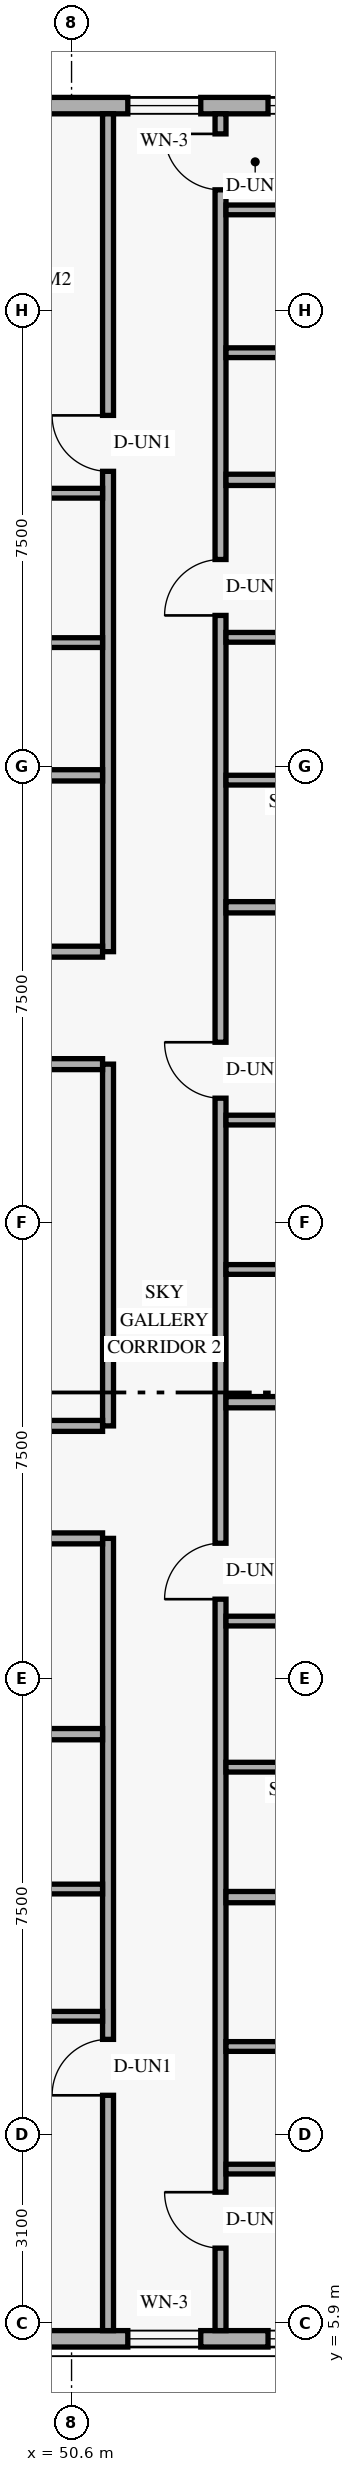
"""IFC4 building model, lengths in metres.
Left out: names, types, materials, properties, quantities, classifications, styles, units other than length and angle.
Written with IfcOpenShell. Run it as: python <this file> out.ifc"""

import sys

from ifc_helpers import new_model, si_unit, direction, frame, frame_2d, origin, place, context, subcontext, project, spatial, rectangle, extrude, element, fill, save


model = new_model("IFC4")
c1 = context("Model", 3, precision=1e-05, world=origin(), true_north=direction((0.0, 1.0)))
c2 = subcontext(c1, "Body", "Model", "MODEL_VIEW")
j1 = project(units=[si_unit("LENGTHUNIT", "METRE"), si_unit("PLANEANGLEUNIT", "RADIAN")], contexts=[c1])
p1 = place(None, origin())
s1 = spatial("IfcSite", under=j1, at=p1, CompositionType="ELEMENT")
p2 = place(p1, origin())
s2 = spatial("IfcBuilding", under=s1, at=p2, CompositionType="ELEMENT")
p3 = place(p2, frame((0.0, 0.0, 235.2)))
s3 = spatial("IfcBuildingStorey", under=s2, at=p3, CompositionType="ELEMENT", Elevation=235.2)
p4 = place(p3, frame((25.82, 5.635, 0.0), z_axis=(0.0, 0.0, 1.0), x_axis=(1.0, 0.0, 0.0)))
e1 = element("IfcWall", 1, at=p4, inside=s3, PredefinedType="SOLIDWALL", context=c2, shape_type="SweptSolid", body=[
    extrude(rectangle(XDim=32.96, YDim=0.27, at=frame_2d((16.48, 0.0))), origin(), (0.0, 0.0, 1.0), 3.36),
])
p5 = place(p4, frame((3.795, 0.0, 0.85)))
e2 = element("IfcOpeningElement", 2, at=p5, cuts=e1, PredefinedType="OPENING", context=c2, shape_type="SweptSolid", body=[
    extrude(rectangle(XDim=1.35, YDim=1.55, at=frame_2d((0.675, 0.775))), frame((0.0, 0.145, 0.0), z_axis=(0.0, -1.0, 0.0), x_axis=(1.0, 0.0, 0.0)), (0.0, 0.0, 1.0), 0.29),
])
p6 = place(p4, frame((16.176, 0.0, 0.85)))
e3 = element("IfcOpeningElement", 3, at=p6, cuts=e1, PredefinedType="OPENING", context=c2, shape_type="SweptSolid", body=[
    extrude(rectangle(XDim=1.35, YDim=1.55, at=frame_2d((0.675, 0.775))), frame((0.0, 0.145, 0.0), z_axis=(0.0, -1.0, 0.0), x_axis=(1.0, 0.0, 0.0)), (0.0, 0.0, 1.0), 0.29),
])
p7 = place(p4, frame((25.705, 0.0, 0.85)))
e4 = element("IfcOpeningElement", 4, at=p7, cuts=e1, PredefinedType="OPENING", context=c2, shape_type="SweptSolid", body=[
    extrude(rectangle(XDim=1.2, YDim=1.5, at=frame_2d((0.6, 0.75))), frame((0.0, 0.145, 0.0), z_axis=(0.0, -1.0, 0.0), x_axis=(1.0, 0.0, 0.0)), (0.0, 0.0, 1.0), 0.29),
])
p8 = place(p4, frame((28.011, 0.0, 0.85)))
e5 = element("IfcOpeningElement", 5, at=p8, cuts=e1, PredefinedType="OPENING", context=c2, shape_type="SweptSolid", body=[
    extrude(rectangle(XDim=1.35, YDim=1.55, at=frame_2d((0.675, 0.775))), frame((0.0, 0.145, 0.0), z_axis=(0.0, -1.0, 0.0), x_axis=(1.0, 0.0, 0.0)), (0.0, 0.0, 1.0), 0.29),
])
p9 = place(p3, frame((58.78, 42.365, 0.0), z_axis=(0.0, 0.0, 1.0), x_axis=(-1.0, 0.0, 0.0)))
e6 = element("IfcWall", 6, at=p9, inside=s3, PredefinedType="SOLIDWALL", context=c2, shape_type="SweptSolid", body=[
    extrude(rectangle(XDim=32.96, YDim=0.27, at=frame_2d((16.48, 0.0))), origin(), (0.0, 0.0, 1.0), 3.36),
])
p10 = place(p9, frame((17.96, 0.0, 0.85)))
e7 = element("IfcOpeningElement", 7, at=p10, cuts=e6, PredefinedType="OPENING", context=c2, shape_type="SweptSolid", body=[
    extrude(rectangle(XDim=1.35, YDim=1.55, at=frame_2d((0.675, 0.775))), frame((0.0, 0.145, 0.0), z_axis=(0.0, -1.0, 0.0), x_axis=(1.0, 0.0, 0.0)), (0.0, 0.0, 1.0), 0.29),
])
p11 = place(p9, frame((11.885, 0.0, 0.85)))
e8 = element("IfcOpeningElement", 8, at=p11, cuts=e6, PredefinedType="OPENING", context=c2, shape_type="SweptSolid", body=[
    extrude(rectangle(XDim=1.35, YDim=1.55, at=frame_2d((0.675, 0.775))), frame((0.0, 0.145, 0.0), z_axis=(0.0, -1.0, 0.0), x_axis=(1.0, 0.0, 0.0)), (0.0, 0.0, 1.0), 0.29),
])
p12 = place(p9, frame((6.055, 0.0, 0.85)))
e9 = element("IfcOpeningElement", 9, at=p12, cuts=e6, PredefinedType="OPENING", context=c2, shape_type="SweptSolid", body=[
    extrude(rectangle(XDim=1.2, YDim=1.5, at=frame_2d((0.6, 0.75))), frame((0.0, 0.145, 0.0), z_axis=(0.0, -1.0, 0.0), x_axis=(1.0, 0.0, 0.0)), (0.0, 0.0, 1.0), 0.29),
])
p13 = place(p9, frame((3.599, 0.0, 0.85)))
e10 = element("IfcOpeningElement", 10, at=p13, cuts=e6, PredefinedType="OPENING", context=c2, shape_type="SweptSolid", body=[
    extrude(rectangle(XDim=1.35, YDim=1.55, at=frame_2d((0.675, 0.775))), frame((0.0, 0.145, 0.0), z_axis=(0.0, -1.0, 0.0), x_axis=(1.0, 0.0, 0.0)), (0.0, 0.0, 1.0), 0.29),
])
p14 = place(p3, frame((51.2, 5.77, 0.0), z_axis=(0.0, 0.0, 1.0), x_axis=(0.0, 1.0, 0.0)))
e11 = element("IfcWall", 11, at=p14, inside=s3, PredefinedType="STANDARD", context=c2, shape_type="SweptSolid", body=[
    extrude(rectangle(XDim=13.03, YDim=0.18, at=frame_2d((6.515, 0.0))), origin(), (0.0, 0.0, 1.0), 2.803),
])
p15 = place(p14, frame((3.87, 0.0, 0.0)))
e12 = element("IfcOpeningElement", 12, at=p15, cuts=e11, PredefinedType="OPENING", context=c2, shape_type="SweptSolid", body=[
    extrude(rectangle(XDim=0.92, YDim=2.15, at=frame_2d((0.46, 1.075))), frame((0.0, 0.1, 0.0), z_axis=(0.0, -1.0, 0.0), x_axis=(1.0, 0.0, 0.0)), (0.0, 0.0, 1.0), 0.2),
])
p16 = place(p3, frame((51.2, 20.65, 0.0), z_axis=(0.0, 0.0, 1.0), x_axis=(0.0, 1.0, 0.0)))
e13 = element("IfcWall", 13, at=p16, inside=s3, PredefinedType="STANDARD", context=c2, shape_type="SweptSolid", body=[
    extrude(rectangle(XDim=5.95, YDim=0.18, at=frame_2d((2.975, 0.0))), origin(), (0.0, 0.0, 1.0), 3.36),
])
p17 = place(p3, frame((51.2, 28.45, 0.0), z_axis=(0.0, 0.0, 1.0), x_axis=(0.0, 1.0, 0.0)))
e14 = element("IfcWall", 14, at=p17, inside=s3, PredefinedType="STANDARD", context=c2, shape_type="SweptSolid", body=[
    extrude(rectangle(XDim=13.78, YDim=0.18, at=frame_2d((6.89, 0.0))), origin(), (0.0, 0.0, 1.0), 2.803),
])
p18 = place(p17, frame((7.9, 0.0, 0.0)))
e15 = element("IfcOpeningElement", 15, at=p18, cuts=e14, PredefinedType="OPENING", context=c2, shape_type="SweptSolid", body=[
    extrude(rectangle(XDim=0.92, YDim=2.15, at=frame_2d((0.46, 1.075))), frame((0.0, 0.1, 0.0), z_axis=(0.0, -1.0, 0.0), x_axis=(1.0, 0.0, 0.0)), (0.0, 0.0, 1.0), 0.2),
])
p19 = place(p3, frame((37.64, 18.8, 0.0), z_axis=(0.0, 0.0, 1.0), x_axis=(1.0, 0.0, 0.0)))
e16 = element("IfcWall", 16, at=p19, inside=s3, PredefinedType="STANDARD", context=c2, shape_type="SweptSolid", body=[
    extrude(rectangle(XDim=13.47, YDim=0.18, at=frame_2d((6.735, 0.0))), origin(), (0.0, 0.0, 1.0), 2.803),
])
p20 = place(p3, frame((37.64, 20.65, 0.0), z_axis=(0.0, 0.0, 1.0), x_axis=(1.0, 0.0, 0.0)))
e17 = element("IfcWall", 17, at=p20, inside=s3, PredefinedType="STANDARD", context=c2, shape_type="SweptSolid", body=[
    extrude(rectangle(XDim=13.47, YDim=0.18, at=frame_2d((6.735, 0.0))), origin(), (0.0, 0.0, 1.0), 2.803),
])
p21 = place(p20, frame((0.32, 0.0, 0.0)))
e18 = element("IfcOpeningElement", 18, at=p21, cuts=e17, PredefinedType="OPENING", context=c2, shape_type="SweptSolid", body=[
    extrude(rectangle(XDim=0.92, YDim=2.15, at=frame_2d((0.46, 1.075))), frame((0.0, 0.1, 0.0), z_axis=(0.0, -1.0, 0.0), x_axis=(1.0, 0.0, 0.0)), (0.0, 0.0, 1.0), 0.2),
])
for number, where, z_axis, x_axis in (
    (19, (37.64, 26.6, 0.0), (0.0, 0.0, 1.0), (1.0, 0.0, 0.0)),
    (20, (37.64, 28.45, 0.0), (0.0, 0.0, 1.0), (1.0, 0.0, 0.0)),
):
    element("IfcWall", number, at=place(p3, frame(where, z_axis=z_axis, x_axis=x_axis)), inside=s3, PredefinedType="STANDARD", context=c2, shape_type="SweptSolid", body=[
        extrude(rectangle(XDim=13.47, YDim=0.18, at=frame_2d((6.735, 0.0))), origin(), (0.0, 0.0, 1.0), 2.803),
    ])
p22 = place(p3, frame((53.05, 5.77, 0.0), z_axis=(0.0, 0.0, 1.0), x_axis=(0.0, 1.0, 0.0)))
e21 = element("IfcWall", 21, at=p22, inside=s3, PredefinedType="STANDARD", context=c2, shape_type="SweptSolid", body=[
    extrude(rectangle(XDim=36.46, YDim=0.18, at=frame_2d((18.23, 0.0))), origin(), (0.0, 0.0, 1.0), 2.803),
])
p23 = place(p22, frame((1.357, 0.0, 0.0)))
e22 = element("IfcOpeningElement", 22, at=p23, cuts=e21, PredefinedType="OPENING", context=c2, shape_type="SweptSolid", body=[
    extrude(rectangle(XDim=0.92, YDim=2.15, at=frame_2d((0.46, 1.075))), frame((0.0, 0.1, 0.0), z_axis=(0.0, -1.0, 0.0), x_axis=(1.0, 0.0, 0.0)), (0.0, 0.0, 1.0), 0.2),
])
p24 = place(p22, frame((12.03, 0.0, 0.0)))
e23 = element("IfcOpeningElement", 23, at=p24, cuts=e21, PredefinedType="OPENING", context=c2, shape_type="SweptSolid", body=[
    extrude(rectangle(XDim=0.92, YDim=2.15, at=frame_2d((0.46, 1.075))), frame((0.0, 0.1, 0.0), z_axis=(0.0, -1.0, 0.0), x_axis=(1.0, 0.0, 0.0)), (0.0, 0.0, 1.0), 0.2),
])
p25 = place(p22, frame((20.27, 0.0, 0.0)))
e24 = element("IfcOpeningElement", 24, at=p25, cuts=e21, PredefinedType="OPENING", context=c2, shape_type="SweptSolid", body=[
    extrude(rectangle(XDim=0.92, YDim=2.15, at=frame_2d((0.46, 1.075))), frame((0.0, 0.1, 0.0), z_axis=(0.0, -1.0, 0.0), x_axis=(1.0, 0.0, 0.0)), (0.0, 0.0, 1.0), 0.2),
])
p26 = place(p22, frame((28.21, 0.0, 0.0)))
e25 = element("IfcOpeningElement", 25, at=p26, cuts=e21, PredefinedType="OPENING", context=c2, shape_type="SweptSolid", body=[
    extrude(rectangle(XDim=0.92, YDim=2.15, at=frame_2d((0.46, 1.075))), frame((0.0, 0.1, 0.0), z_axis=(0.0, -1.0, 0.0), x_axis=(1.0, 0.0, 0.0)), (0.0, 0.0, 1.0), 0.2),
])
p27 = place(p22, frame((35.21, 0.0, 0.0)))
e26 = element("IfcOpeningElement", 26, at=p27, cuts=e21, PredefinedType="OPENING", context=c2, shape_type="SweptSolid", body=[
    extrude(rectangle(XDim=0.92, YDim=2.15, at=frame_2d((0.46, 1.075))), frame((0.0, 0.1, 0.0), z_axis=(0.0, -1.0, 0.0), x_axis=(1.0, 0.0, 0.0)), (0.0, 0.0, 1.0), 0.2),
])
p28 = place(p3, frame((53.14, 8.427, 0.0), z_axis=(0.0, 0.0, 1.0), x_axis=(1.0, 0.0, 0.0)))
e27 = element("IfcWall", 27, at=p28, inside=s3, PredefinedType="PLUMBINGWALL", context=c2, shape_type="SweptSolid", body=[
    extrude(rectangle(XDim=5.53, YDim=0.16, at=frame_2d((2.765, 0.0))), origin(), (0.0, 0.0, 1.0), 2.879),
])
p29 = place(p3, frame((53.14, 10.443, 0.0), z_axis=(0.0, 0.0, 1.0), x_axis=(1.0, 0.0, 0.0)))
e28 = element("IfcWall", 28, at=p29, inside=s3, PredefinedType="PLUMBINGWALL", context=c2, shape_type="SweptSolid", body=[
    extrude(rectangle(XDim=5.37, YDim=0.16, at=frame_2d((2.685, 0.0))), origin(), (0.0, 0.0, 1.0), 2.879),
])
p30 = place(p3, frame((53.14, 12.9, 0.0), z_axis=(0.0, 0.0, 1.0), x_axis=(1.0, 0.0, 0.0)))
e29 = element("IfcWall", 29, at=p30, inside=s3, PredefinedType="PARTITIONING", context=c2, shape_type="SweptSolid", body=[
    extrude(rectangle(XDim=8.99, YDim=0.185, at=frame_2d((4.495, 0.0))), origin(), (0.0, 0.0, 1.0), 2.879),
])
p31 = place(p3, frame((53.14, 17.44, 0.0), z_axis=(0.0, 0.0, 1.0), x_axis=(1.0, 0.0, 0.0)))
e30 = element("IfcWall", 30, at=p31, inside=s3, PredefinedType="PLUMBINGWALL", context=c2, shape_type="SweptSolid", body=[
    extrude(rectangle(XDim=5.53, YDim=0.16, at=frame_2d((2.765, 0.0))), origin(), (0.0, 0.0, 1.0), 2.803),
])
p32 = place(p3, frame((53.14, 15.037, 0.0), z_axis=(0.0, 0.0, 1.0), x_axis=(1.0, 0.0, 0.0)))
e31 = element("IfcWall", 31, at=p32, inside=s3, PredefinedType="PLUMBINGWALL", context=c2, shape_type="SweptSolid", body=[
    extrude(rectangle(XDim=5.37, YDim=0.16, at=frame_2d((2.685, 0.0))), origin(), (0.0, 0.0, 1.0), 2.879),
])
p33 = place(p3, frame((53.14, 21.04, 0.0), z_axis=(0.0, 0.0, 1.0), x_axis=(1.0, 0.0, 0.0)))
e32 = element("IfcWall", 32, at=p33, inside=s3, PredefinedType="PARTITIONING", context=c2, shape_type="SweptSolid", body=[
    extrude(rectangle(XDim=8.99, YDim=0.185, at=frame_2d((4.495, 0.0))), origin(), (0.0, 0.0, 1.0), 2.879),
])
p34 = place(p3, frame((53.14, 25.68, 0.0), z_axis=(0.0, 0.0, 1.0), x_axis=(1.0, 0.0, 0.0)))
e33 = element("IfcWall", 33, at=p34, inside=s3, PredefinedType="PLUMBINGWALL", context=c2, shape_type="SweptSolid", body=[
    extrude(rectangle(XDim=2.758, YDim=0.16, at=frame_2d((1.379, 0.0))), origin(), (0.0, 0.0, 1.0), 3.36),
])
p35 = place(p3, frame((53.14, 23.223, 0.0), z_axis=(0.0, 0.0, 1.0), x_axis=(1.0, 0.0, 0.0)))
e34 = element("IfcWall", 34, at=p35, inside=s3, PredefinedType="PLUMBINGWALL", context=c2, shape_type="SweptSolid", body=[
    extrude(rectangle(XDim=2.598, YDim=0.16, at=frame_2d((1.299, 0.0))), origin(), (0.0, 0.0, 1.0), 3.36),
])
p36 = place(p3, frame((53.14, 29.18, 0.0), z_axis=(0.0, 0.0, 1.0), x_axis=(1.0, 0.0, 0.0)))
e35 = element("IfcWall", 35, at=p36, inside=s3, PredefinedType="PARTITIONING", context=c2, shape_type="SweptSolid", body=[
    extrude(rectangle(XDim=8.99, YDim=0.185, at=frame_2d((4.495, 0.0))), origin(), (0.0, 0.0, 1.0), 2.879),
])
p37 = place(p3, frame((53.14, 33.62, 0.0), z_axis=(0.0, 0.0, 1.0), x_axis=(1.0, 0.0, 0.0)))
e36 = element("IfcWall", 36, at=p37, inside=s3, PredefinedType="PLUMBINGWALL", context=c2, shape_type="SweptSolid", body=[
    extrude(rectangle(XDim=5.53, YDim=0.16, at=frame_2d((2.765, 0.0))), origin(), (0.0, 0.0, 1.0), 2.879),
])
p38 = place(p3, frame((53.14, 31.271, 0.0), z_axis=(0.0, 0.0, 1.0), x_axis=(1.0, 0.0, 0.0)))
e37 = element("IfcWall", 37, at=p38, inside=s3, PredefinedType="PLUMBINGWALL", context=c2, shape_type="SweptSolid", body=[
    extrude(rectangle(XDim=5.37, YDim=0.16, at=frame_2d((2.685, 0.0))), origin(), (0.0, 0.0, 1.0), 2.879),
])
p39 = place(p3, frame((53.14, 36.21, 0.0), z_axis=(0.0, 0.0, 1.0), x_axis=(1.0, 0.0, 0.0)))
e38 = element("IfcWall", 38, at=p39, inside=s3, PredefinedType="PARTITIONING", context=c2, shape_type="SweptSolid", body=[
    extrude(rectangle(XDim=8.99, YDim=0.185, at=frame_2d((4.495, 0.0))), origin(), (0.0, 0.0, 1.0), 2.879),
])
p40 = place(p3, frame((53.14, 40.65, 0.0), z_axis=(0.0, 0.0, 1.0), x_axis=(1.0, 0.0, 0.0)))
e39 = element("IfcWall", 39, at=p40, inside=s3, PredefinedType="PLUMBINGWALL", context=c2, shape_type="SweptSolid", body=[
    extrude(rectangle(XDim=5.53, YDim=0.16, at=frame_2d((2.765, 0.0))), origin(), (0.0, 0.0, 1.0), 2.879),
])
p41 = place(p3, frame((53.14, 38.301, 0.0), z_axis=(0.0, 0.0, 1.0), x_axis=(1.0, 0.0, 0.0)))
e40 = element("IfcWall", 40, at=p41, inside=s3, PredefinedType="PLUMBINGWALL", context=c2, shape_type="SweptSolid", body=[
    extrude(rectangle(XDim=5.37, YDim=0.16, at=frame_2d((2.685, 0.0))), origin(), (0.0, 0.0, 1.0), 2.879),
])
p42 = place(p3, frame((37.64, 15.58, 0.0), z_axis=(0.0, 0.0, 1.0), x_axis=(1.0, 0.0, 0.0)))
e41 = element("IfcWall", 41, at=p42, inside=s3, PredefinedType="PARTITIONING", context=c2, shape_type="SweptSolid", body=[
    extrude(rectangle(XDim=13.47, YDim=0.185, at=frame_2d((6.735, 0.0))), origin(), (0.0, 0.0, 1.0), 2.803),
])
p43 = place(p3, frame((48.504, 10.94, 0.0), z_axis=(0.0, 0.0, 1.0), x_axis=(1.0, 0.0, 0.0)))
e42 = element("IfcWall", 42, at=p43, inside=s3, PredefinedType="PLUMBINGWALL", context=c2, shape_type="SweptSolid", body=[
    extrude(rectangle(XDim=2.606, YDim=0.16, at=frame_2d((1.303, 0.0))), origin(), (0.0, 0.0, 1.0), 3.36),
])
p44 = place(p3, frame((48.664, 13.033, 0.0), z_axis=(0.0, 0.0, 1.0), x_axis=(1.0, 0.0, 0.0)))
e43 = element("IfcWall", 43, at=p44, inside=s3, PredefinedType="PLUMBINGWALL", context=c2, shape_type="SweptSolid", body=[
    extrude(rectangle(XDim=2.446, YDim=0.16, at=frame_2d((1.223, 0.0))), origin(), (0.0, 0.0, 1.0), 3.36),
])
p45 = place(p3, frame((38.173, 31.35, 0.0), z_axis=(0.0, 0.0, 1.0), x_axis=(1.0, 0.0, 0.0)))
e44 = element("IfcWall", 44, at=p45, inside=s3, PredefinedType="PARTITIONING", context=c2, shape_type="SweptSolid", body=[
    extrude(rectangle(XDim=12.938, YDim=0.185, at=frame_2d((6.469, 0.0))), origin(), (0.0, 0.0, 1.0), 2.803),
])
p46 = place(p3, frame((48.428, 35.99, 0.0), z_axis=(0.0, 0.0, 1.0), x_axis=(1.0, 0.0, 0.0)))
e45 = element("IfcWall", 45, at=p46, inside=s3, PredefinedType="PLUMBINGWALL", context=c2, shape_type="SweptSolid", body=[
    extrude(rectangle(XDim=2.682, YDim=0.16, at=frame_2d((1.341, 0.0))), origin(), (0.0, 0.0, 1.0), 3.36),
])
p47 = place(p3, frame((48.588, 33.533, 0.0), z_axis=(0.0, 0.0, 1.0), x_axis=(1.0, 0.0, 0.0)))
e46 = element("IfcWall", 46, at=p47, inside=s3, PredefinedType="PLUMBINGWALL", context=c2, shape_type="SweptSolid", body=[
    extrude(rectangle(XDim=2.522, YDim=0.16, at=frame_2d((1.261, 0.0))), origin(), (0.0, 0.0, 1.0), 3.36),
])
p48 = place(p7, origin())
e47 = element("IfcWindow", 47, at=p48, inside=s3, PartitioningType="SINGLE_PANEL", PredefinedType="WINDOW", context=c2, shape_type="SweptSolid", body=[
    extrude(rectangle(XDim=1.2, YDim=1.5, at=frame_2d((0.6, 0.75))), frame((0.0, 0.03, 0.0), z_axis=(0.0, -1.0, 0.0), x_axis=(1.0, 0.0, 0.0)), (0.0, 0.0, 1.0), 0.06),
])
fill(e4, e47)
p49 = place(p8, origin())
e48 = element("IfcWindow", 48, at=p49, inside=s3, PartitioningType="SINGLE_PANEL", PredefinedType="WINDOW", context=c2, shape_type="SweptSolid", body=[
    extrude(rectangle(XDim=1.35, YDim=1.55, at=frame_2d((0.675, 0.775))), frame((0.0, 0.03, 0.0), z_axis=(0.0, -1.0, 0.0), x_axis=(1.0, 0.0, 0.0)), (0.0, 0.0, 1.0), 0.06),
])
fill(e5, e48)
p50 = place(p12, origin())
e49 = element("IfcWindow", 49, at=p50, inside=s3, PartitioningType="SINGLE_PANEL", PredefinedType="WINDOW", context=c2, shape_type="SweptSolid", body=[
    extrude(rectangle(XDim=1.2, YDim=1.5, at=frame_2d((0.6, 0.75))), frame((0.0, 0.03, 0.0), z_axis=(0.0, -1.0, 0.0), x_axis=(1.0, 0.0, 0.0)), (0.0, 0.0, 1.0), 0.06),
])
fill(e9, e49)
p51 = place(p13, origin())
e50 = element("IfcWindow", 50, at=p51, inside=s3, PartitioningType="SINGLE_PANEL", PredefinedType="WINDOW", context=c2, shape_type="SweptSolid", body=[
    extrude(rectangle(XDim=1.35, YDim=1.55, at=frame_2d((0.675, 0.775))), frame((0.0, 0.03, 0.0), z_axis=(0.0, -1.0, 0.0), x_axis=(1.0, 0.0, 0.0)), (0.0, 0.0, 1.0), 0.06),
])
fill(e10, e50)
p52 = place(p23, origin())
e51 = element("IfcDoor", 51, at=p52, inside=s3, OperationType="SINGLE_SWING_RIGHT", PredefinedType="DOOR", context=c2, shape_type="SweptSolid", body=[
    extrude(rectangle(XDim=0.92, YDim=2.15, at=frame_2d((0.46, 1.075))), frame((0.0, 0.025, 0.0), z_axis=(0.0, -1.0, 0.0), x_axis=(1.0, 0.0, 0.0)), (0.0, 0.0, 1.0), 0.05),
])
fill(e22, e51)
p53 = place(p24, origin())
e52 = element("IfcDoor", 52, at=p53, inside=s3, OperationType="SINGLE_SWING_LEFT", PredefinedType="DOOR", context=c2, shape_type="SweptSolid", body=[
    extrude(rectangle(XDim=0.92, YDim=2.15, at=frame_2d((0.46, 1.075))), frame((0.0, 0.025, 0.0), z_axis=(0.0, -1.0, 0.0), x_axis=(1.0, 0.0, 0.0)), (0.0, 0.0, 1.0), 0.05),
])
fill(e23, e52)
p54 = place(p25, origin())
e53 = element("IfcDoor", 53, at=p54, inside=s3, OperationType="SINGLE_SWING_RIGHT", PredefinedType="DOOR", context=c2, shape_type="SweptSolid", body=[
    extrude(rectangle(XDim=0.92, YDim=2.15, at=frame_2d((0.46, 1.075))), frame((0.0, 0.025, 0.0), z_axis=(0.0, -1.0, 0.0), x_axis=(1.0, 0.0, 0.0)), (0.0, 0.0, 1.0), 0.05),
])
fill(e24, e53)
p55 = place(p26, origin())
e54 = element("IfcDoor", 54, at=p55, inside=s3, OperationType="SINGLE_SWING_LEFT", PredefinedType="DOOR", context=c2, shape_type="SweptSolid", body=[
    extrude(rectangle(XDim=0.92, YDim=2.15, at=frame_2d((0.46, 1.075))), frame((0.0, 0.025, 0.0), z_axis=(0.0, -1.0, 0.0), x_axis=(1.0, 0.0, 0.0)), (0.0, 0.0, 1.0), 0.05),
])
fill(e25, e54)
p56 = place(p27, origin())
e55 = element("IfcDoor", 55, at=p56, inside=s3, OperationType="SINGLE_SWING_RIGHT", PredefinedType="DOOR", context=c2, shape_type="SweptSolid", body=[
    extrude(rectangle(XDim=0.92, YDim=2.15, at=frame_2d((0.46, 1.075))), frame((0.0, 0.025, 0.0), z_axis=(0.0, -1.0, 0.0), x_axis=(1.0, 0.0, 0.0)), (0.0, 0.0, 1.0), 0.05),
])
fill(e26, e55)
p57 = place(p15, origin())
e56 = element("IfcDoor", 56, at=p57, inside=s3, OperationType="SINGLE_SWING_LEFT", PredefinedType="DOOR", context=c2, shape_type="SweptSolid", body=[
    extrude(rectangle(XDim=0.92, YDim=2.15, at=frame_2d((0.46, 1.075))), frame((0.0, 0.025, 0.0), z_axis=(0.0, -1.0, 0.0), x_axis=(1.0, 0.0, 0.0)), (0.0, 0.0, 1.0), 0.05),
])
fill(e12, e56)
p58 = place(p18, origin())
e57 = element("IfcDoor", 57, at=p58, inside=s3, OperationType="SINGLE_SWING_RIGHT", PredefinedType="DOOR", context=c2, shape_type="SweptSolid", body=[
    extrude(rectangle(XDim=0.92, YDim=2.15, at=frame_2d((0.46, 1.075))), frame((0.0, 0.025, 0.0), z_axis=(0.0, -1.0, 0.0), x_axis=(1.0, 0.0, 0.0)), (0.0, 0.0, 1.0), 0.05),
])
fill(e15, e57)
save(model, sys.argv[1])
